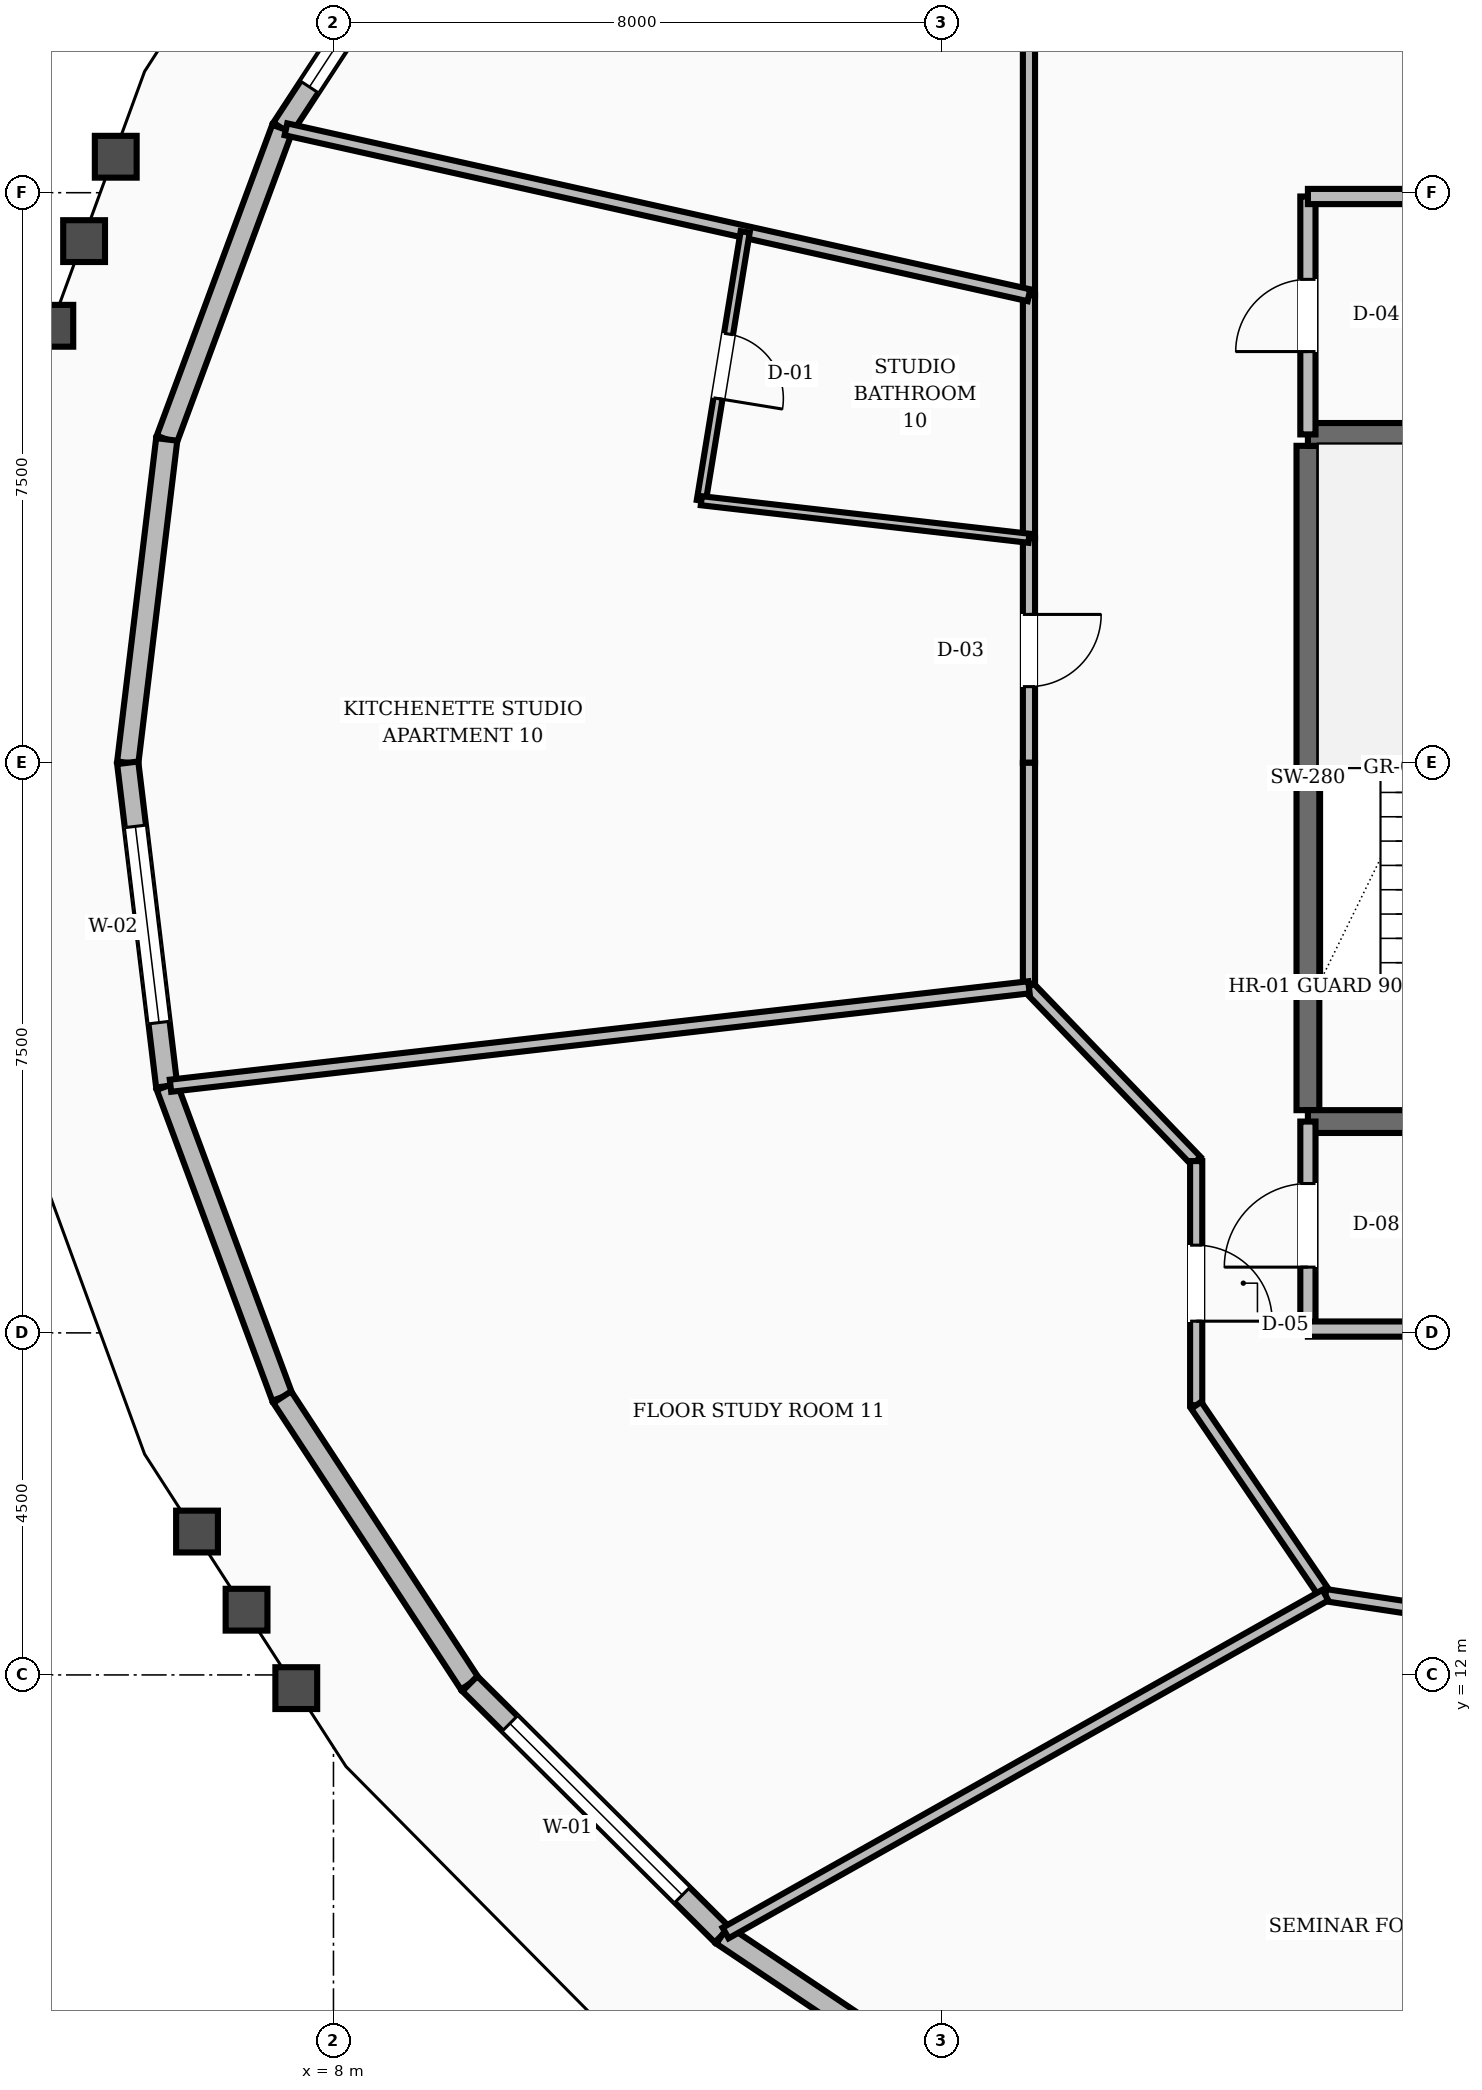
"""IFC4 building model, lengths in metres.
Left out: names, types, materials, properties, quantities, classifications, styles, units other than length and angle.
Written with IfcOpenShell. Run it as: python <this file> out.ifc"""

import sys

from ifc_helpers import new_model, si_unit, direction, frame, frame_2d, origin, place, context, subcontext, project, spatial, rectangle, extrude, element, fill, save


model = new_model("IFC4")
c1 = context("Model", 3, precision=1e-05, world=origin(), true_north=direction((0.0, 1.0)))
c2 = subcontext(c1, "Body", "Model", "MODEL_VIEW")
j1 = project(units=[si_unit("LENGTHUNIT", "METRE"), si_unit("PLANEANGLEUNIT", "RADIAN")], contexts=[c1])
p1 = place(None, origin())
s1 = spatial("IfcSite", under=j1, at=p1, CompositionType="ELEMENT")
p2 = place(p1, origin())
s2 = spatial("IfcBuilding", under=s1, at=p2, CompositionType="ELEMENT")
p3 = place(p2, frame((0.0, 0.0, 120.8)))
s3 = spatial("IfcBuildingStorey", under=s2, at=p3, CompositionType="ELEMENT", Elevation=120.8)
p4 = place(p3, frame((20.82, 19.43, 0.0), z_axis=(0.0, 0.0, 1.0), x_axis=(0.0, 1.0, 0.0)))
e1 = element("IfcWall", 1, at=p4, inside=s3, PredefinedType="SHEAR", context=c2, shape_type="SweptSolid", body=[
    extrude(rectangle(XDim=8.74, YDim=0.3, at=frame_2d((4.37, 0.0))), origin(), (0.0, 0.0, 1.0), 3.6),
])
p5 = place(p3, frame((20.82, 19.28, 0.0), z_axis=(0.0, 0.0, 1.0), x_axis=(1.0, 0.0, 0.0)))
e2 = element("IfcWall", 2, at=p5, inside=s3, PredefinedType="SHEAR", context=c2, shape_type="SweptSolid", body=[
    extrude(rectangle(XDim=3.6, YDim=0.3, at=frame_2d((1.8, 0.0))), origin(), (0.0, 0.0, 1.0), 3.6),
])
p6 = place(p5, frame((1.3, 0.0, 0.0)))
e3 = element("IfcOpeningElement", 3, at=p6, cuts=e2, PredefinedType="OPENING", context=c2, shape_type="SweptSolid", body=[
    extrude(rectangle(XDim=1.1, YDim=2.1, at=frame_2d((0.55, 1.05))), frame((0.0, 0.16, 0.0), z_axis=(0.0, -1.0, 0.0), x_axis=(1.0, 0.0, 0.0)), (0.0, 0.0, 1.0), 0.32),
])
p7 = place(p3, frame((20.82, 28.32, 0.0), z_axis=(0.0, 0.0, 1.0), x_axis=(1.0, 0.0, 0.0)))
e4 = element("IfcWall", 4, at=p7, inside=s3, PredefinedType="SHEAR", context=c2, shape_type="SweptSolid", body=[
    extrude(rectangle(XDim=3.6, YDim=0.3, at=frame_2d((1.8, 0.0))), origin(), (0.0, 0.0, 1.0), 3.6),
])
p8 = place(p3, frame((9.794, 36.115, 0.0), z_axis=(0.0, 0.0, 1.0), x_axis=(-0.547716413999, -0.836664048371, 0.0)))
e5 = element("IfcWall", 5, at=p8, inside=s3, PredefinedType="STANDARD", context=c2, shape_type="SweptSolid", body=[
    extrude(rectangle(XDim=4.506, YDim=0.28, at=frame_2d((2.253, 0.0))), origin(), (0.0, 0.0, 1.0), 2.82),
])
p9 = place(p8, frame((0.653, 0.0, 0.8)))
e6 = element("IfcOpeningElement", 6, at=p9, cuts=e5, PredefinedType="OPENING", context=c2, shape_type="SweptSolid", body=[
    extrude(rectangle(XDim=3.2, YDim=1.65, at=frame_2d((1.6, 0.825))), frame((0.0, 0.15, 0.0), z_axis=(0.0, -1.0, 0.0), x_axis=(1.0, 0.0, 0.0)), (0.0, 0.0, 1.0), 0.3),
])
p10 = place(p3, frame((7.326, 32.345, 0.0), z_axis=(0.0, 0.0, 1.0), x_axis=(-0.348252546088, -0.937400748956, 0.0)))
e7 = element("IfcWall", 7, at=p10, inside=s3, PredefinedType="STANDARD", context=c2, shape_type="SweptSolid", body=[
    extrude(rectangle(XDim=4.364, YDim=0.28, at=frame_2d((2.182, 0.0))), origin(), (0.0, 0.0, 1.0), 2.82),
])
p11 = place(p3, frame((5.806, 28.254, 0.0), z_axis=(0.0, 0.0, 1.0), x_axis=(-0.119756259899, -0.992803323028, 0.0)))
e8 = element("IfcWall", 8, at=p11, inside=s3, PredefinedType="STANDARD", context=c2, shape_type="SweptSolid", body=[
    extrude(rectangle(XDim=4.285, YDim=0.28, at=frame_2d((2.143, 0.0))), origin(), (0.0, 0.0, 1.0), 2.82),
])
p12 = place(p3, frame((5.293, 24.0, 0.0), z_axis=(0.0, 0.0, 1.0), x_axis=(0.119756259899, -0.992803323028, 0.0)))
e9 = element("IfcWall", 9, at=p12, inside=s3, PredefinedType="STANDARD", context=c2, shape_type="SweptSolid", body=[
    extrude(rectangle(XDim=4.285, YDim=0.28, at=frame_2d((2.143, 0.0))), origin(), (0.0, 0.0, 1.0), 2.82),
])
p13 = place(p12, frame((0.843, 0.0, 0.8)))
e10 = element("IfcOpeningElement", 10, at=p13, cuts=e9, PredefinedType="OPENING", context=c2, shape_type="SweptSolid", body=[
    extrude(rectangle(XDim=2.6, YDim=1.65, at=frame_2d((1.3, 0.825))), frame((0.0, 0.15, 0.0), z_axis=(0.0, -1.0, 0.0), x_axis=(1.0, 0.0, 0.0)), (0.0, 0.0, 1.0), 0.3),
])
p14 = place(p3, frame((5.806, 19.746, 0.0), z_axis=(0.0, 0.0, 1.0), x_axis=(0.348252546088, -0.937400748956, 0.0)))
e11 = element("IfcWall", 11, at=p14, inside=s3, PredefinedType="STANDARD", context=c2, shape_type="SweptSolid", body=[
    extrude(rectangle(XDim=4.364, YDim=0.28, at=frame_2d((2.182, 0.0))), origin(), (0.0, 0.0, 1.0), 2.82),
])
p15 = place(p3, frame((7.326, 15.655, 0.0), z_axis=(0.0, 0.0, 1.0), x_axis=(0.547716413999, -0.836664048371, 0.0)))
e12 = element("IfcWall", 12, at=p15, inside=s3, PredefinedType="STANDARD", context=c2, shape_type="SweptSolid", body=[
    extrude(rectangle(XDim=4.506, YDim=0.28, at=frame_2d((2.253, 0.0))), origin(), (0.0, 0.0, 1.0), 2.82),
])
p16 = place(p3, frame((9.794, 11.885, 0.0), z_axis=(0.0, 0.0, 1.0), x_axis=(0.708876231206, -0.705332892208, 0.0)))
e13 = element("IfcWall", 13, at=p16, inside=s3, PredefinedType="STANDARD", context=c2, shape_type="SweptSolid", body=[
    extrude(rectangle(XDim=4.685, YDim=0.28, at=frame_2d((2.343, 0.0))), origin(), (0.0, 0.0, 1.0), 2.82),
])
p17 = place(p16, frame((0.743, 0.0, 0.8)))
e14 = element("IfcOpeningElement", 14, at=p17, cuts=e13, PredefinedType="OPENING", context=c2, shape_type="SweptSolid", body=[
    extrude(rectangle(XDim=3.2, YDim=1.65, at=frame_2d((1.6, 0.825))), frame((0.0, 0.15, 0.0), z_axis=(0.0, -1.0, 0.0), x_axis=(1.0, 0.0, 0.0)), (0.0, 0.0, 1.0), 0.3),
])
p18 = place(p3, frame((13.115, 8.58, 0.0), z_axis=(0.0, 0.0, 1.0), x_axis=(0.830737301714, -0.556664652678, 0.0)))
e15 = element("IfcWall", 15, at=p18, inside=s3, PredefinedType="STANDARD", context=c2, shape_type="SweptSolid", body=[
    extrude(rectangle(XDim=4.872, YDim=0.28, at=frame_2d((2.436, 0.0))), origin(), (0.0, 0.0, 1.0), 2.82),
])
p19 = place(p3, frame((20.82, 16.55, 0.0), z_axis=(0.0, 0.0, 1.0), x_axis=(0.0, 1.0, 0.0)))
e16 = element("IfcWall", 16, at=p19, inside=s3, PredefinedType="SOLIDWALL", context=c2, shape_type="SweptSolid", body=[
    extrude(rectangle(XDim=2.73, YDim=0.2, at=frame_2d((1.365, 0.0))), origin(), (0.0, 0.0, 1.0), 2.8),
])
p20 = place(p19, frame((0.815, 0.0, 0.0)))
e17 = element("IfcOpeningElement", 17, at=p20, cuts=e16, PredefinedType="OPENING", context=c2, shape_type="SweptSolid", body=[
    extrude(rectangle(XDim=1.1, YDim=2.1, at=frame_2d((0.55, 1.05))), frame((0.0, 0.11, 0.0), z_axis=(0.0, -1.0, 0.0), x_axis=(1.0, 0.0, 0.0)), (0.0, 0.0, 1.0), 0.22),
])
p21 = place(p3, frame((20.82, 16.55, 0.0), z_axis=(0.0, 0.0, 1.0), x_axis=(1.0, 0.0, 0.0)))
e18 = element("IfcWall", 18, at=p21, inside=s3, PredefinedType="SOLIDWALL", context=c2, shape_type="SweptSolid", body=[
    extrude(rectangle(XDim=3.98, YDim=0.2, at=frame_2d((1.99, 0.0))), origin(), (0.0, 0.0, 1.0), 2.8),
])
p22 = place(p3, frame((20.82, 28.32, 0.0), z_axis=(0.0, 0.0, 1.0), x_axis=(0.0, 1.0, 0.0)))
e19 = element("IfcWall", 19, at=p22, inside=s3, PredefinedType="SOLIDWALL", context=c2, shape_type="SweptSolid", body=[
    extrude(rectangle(XDim=3.13, YDim=0.2, at=frame_2d((1.565, 0.0))), origin(), (0.0, 0.0, 1.0), 2.8),
])
p23 = place(p22, frame((1.09, 0.0, 0.0)))
e20 = element("IfcOpeningElement", 20, at=p23, cuts=e19, PredefinedType="OPENING", context=c2, shape_type="SweptSolid", body=[
    extrude(rectangle(XDim=0.95, YDim=2.1, at=frame_2d((0.475, 1.05))), frame((0.0, 0.11, 0.0), z_axis=(0.0, -1.0, 0.0), x_axis=(1.0, 0.0, 0.0)), (0.0, 0.0, 1.0), 0.22),
])
p24 = place(p3, frame((20.82, 31.45, 0.0), z_axis=(0.0, 0.0, 1.0), x_axis=(1.0, 0.0, 0.0)))
e21 = element("IfcWall", 21, at=p24, inside=s3, PredefinedType="SOLIDWALL", context=c2, shape_type="SweptSolid", body=[
    extrude(rectangle(XDim=3.98, YDim=0.2, at=frame_2d((1.99, 0.0))), origin(), (0.0, 0.0, 1.0), 2.8),
])
p25 = place(p3, frame((17.15, 33.923, 0.0), z_axis=(0.0, 0.0, 1.0), x_axis=(0.0, -1.0, 0.0)))
e22 = element("IfcWall", 22, at=p25, inside=s3, PredefinedType="SOLIDWALL", context=c2, shape_type="SweptSolid", body=[
    extrude(rectangle(XDim=3.771, YDim=0.16, at=frame_2d((1.886, 0.0))), origin(), (0.0, 0.0, 1.0), 2.8),
])
p26 = place(p3, frame((17.15, 30.151, 0.0), z_axis=(0.0, 0.0, 1.0), x_axis=(0.0, -1.0, 0.0)))
e23 = element("IfcWall", 23, at=p26, inside=s3, PredefinedType="SOLIDWALL", context=c2, shape_type="SweptSolid", body=[
    extrude(rectangle(XDim=3.197, YDim=0.16, at=frame_2d((1.599, 0.0))), origin(), (0.0, 0.0, 1.0), 2.8),
])
p27 = place(p3, frame((17.15, 26.954, 0.0), z_axis=(0.0, 0.0, 1.0), x_axis=(0.0, -1.0, 0.0)))
e24 = element("IfcWall", 24, at=p27, inside=s3, PredefinedType="SOLIDWALL", context=c2, shape_type="SweptSolid", body=[
    extrude(rectangle(XDim=2.954, YDim=0.16, at=frame_2d((1.477, 0.0))), origin(), (0.0, 0.0, 1.0), 2.8),
])
p28 = place(p27, frame((1.002, 0.0, 0.0)))
e25 = element("IfcOpeningElement", 25, at=p28, cuts=e24, PredefinedType="OPENING", context=c2, shape_type="SweptSolid", body=[
    extrude(rectangle(XDim=0.95, YDim=2.1, at=frame_2d((0.475, 1.05))), frame((0.0, 0.09, 0.0), z_axis=(0.0, -1.0, 0.0), x_axis=(1.0, 0.0, 0.0)), (0.0, 0.0, 1.0), 0.18),
])
p29 = place(p3, frame((17.15, 24.0, 0.0), z_axis=(0.0, 0.0, 1.0), x_axis=(0.0, -1.0, 0.0)))
e26 = element("IfcWall", 26, at=p29, inside=s3, PredefinedType="SOLIDWALL", context=c2, shape_type="SweptSolid", body=[
    extrude(rectangle(XDim=2.954, YDim=0.16, at=frame_2d((1.477, 0.0))), origin(), (0.0, 0.0, 1.0), 2.8),
])
p30 = place(p3, frame((17.15, 21.046, 0.0), z_axis=(0.0, 0.0, 1.0), x_axis=(0.693473090138, -0.72048252807, 0.0)))
e27 = element("IfcWall", 27, at=p30, inside=s3, PredefinedType="SOLIDWALL", context=c2, shape_type="SweptSolid", body=[
    extrude(rectangle(XDim=3.173, YDim=0.16, at=frame_2d((1.586, 0.0))), origin(), (0.0, 0.0, 1.0), 2.8),
])
p31 = place(p3, frame((19.35, 18.76, 0.0), z_axis=(0.0, 0.0, 1.0), x_axis=(0.0, -1.0, 0.0)))
e28 = element("IfcWall", 28, at=p31, inside=s3, PredefinedType="SOLIDWALL", context=c2, shape_type="SweptSolid", body=[
    extrude(rectangle(XDim=3.213, YDim=0.16, at=frame_2d((1.606, 0.0))), origin(), (0.0, 0.0, 1.0), 2.8),
])
p32 = place(p31, frame((1.106, 0.0, 0.0)))
e29 = element("IfcOpeningElement", 29, at=p32, cuts=e28, PredefinedType="OPENING", context=c2, shape_type="SweptSolid", body=[
    extrude(rectangle(XDim=1.0, YDim=2.1, at=frame_2d((0.5, 1.05))), frame((0.0, 0.09, 0.0), z_axis=(0.0, -1.0, 0.0), x_axis=(1.0, 0.0, 0.0)), (0.0, 0.0, 1.0), 0.18),
])
p33 = place(p3, frame((19.35, 15.548, 0.0), z_axis=(0.0, 0.0, 1.0), x_axis=(0.562674669208, -0.826678423955, 0.0)))
e30 = element("IfcWall", 30, at=p33, inside=s3, PredefinedType="SOLIDWALL", context=c2, shape_type="SweptSolid", body=[
    extrude(rectangle(XDim=3.021, YDim=0.16, at=frame_2d((1.511, 0.0))), origin(), (0.0, 0.0, 1.0), 2.8),
])
p34 = place(p3, frame((21.05, 13.05, 0.0), z_axis=(0.0, 0.0, 1.0), x_axis=(0.988710906508, -0.149835721217, 0.0)))
e31 = element("IfcWall", 31, at=p34, inside=s3, PredefinedType="SOLIDWALL", context=c2, shape_type="SweptSolid", body=[
    extrude(rectangle(XDim=3.337, YDim=0.16, at=frame_2d((1.668, 0.0))), origin(), (0.0, 0.0, 1.0), 2.8),
])
p35 = place(p3, frame((17.15, 30.151, 0.0), z_axis=(0.0, 0.0, 1.0), x_axis=(-0.975957101014, 0.217962696303, 0.0)))
e32 = element("IfcWall", 32, at=p35, inside=s3, PredefinedType="SOLIDWALL", context=c2, shape_type="SweptSolid", body=[
    extrude(rectangle(XDim=10.016, YDim=0.16, at=frame_2d((5.008, 0.0))), origin(), (0.0, 0.0, 1.0), 2.8),
])
p36 = place(p3, frame((13.417, 30.985, 0.0), z_axis=(0.0, 0.0, 1.0), x_axis=(-0.161117002458, -0.986935312733, 0.0)))
e33 = element("IfcWall", 33, at=p36, inside=s3, PredefinedType="PARTITIONING", context=c2, shape_type="SweptSolid", body=[
    extrude(rectangle(XDim=3.584, YDim=0.12, at=frame_2d((1.792, 0.0))), origin(), (0.0, 0.0, 1.0), 2.8),
])
p37 = place(p36, frame((1.362, 0.0, 0.0)))
e34 = element("IfcOpeningElement", 34, at=p37, cuts=e33, PredefinedType="OPENING", context=c2, shape_type="SweptSolid", body=[
    extrude(rectangle(XDim=0.86, YDim=2.1, at=frame_2d((0.43, 1.05))), frame((0.0, 0.07, 0.0), z_axis=(0.0, -1.0, 0.0), x_axis=(1.0, 0.0, 0.0)), (0.0, 0.0, 1.0), 0.14),
])
p38 = place(p3, frame((17.15, 26.954, 0.0), z_axis=(0.0, 0.0, 1.0), x_axis=(-0.993493438014, 0.113889370103, 0.0)))
e35 = element("IfcWall", 35, at=p38, inside=s3, PredefinedType="PARTITIONING", context=c2, shape_type="SweptSolid", body=[
    extrude(rectangle(XDim=4.339, YDim=0.12, at=frame_2d((2.169, 0.0))), origin(), (0.0, 0.0, 1.0), 2.8),
])
p39 = place(p3, frame((17.15, 21.046, 0.0), z_axis=(0.0, 0.0, 1.0), x_axis=(-0.993493502976, -0.113888803422, 0.0)))
e36 = element("IfcWall", 36, at=p39, inside=s3, PredefinedType="SOLIDWALL", context=c2, shape_type="SweptSolid", body=[
    extrude(rectangle(XDim=11.368, YDim=0.16, at=frame_2d((5.684, 0.0))), origin(), (0.0, 0.0, 1.0), 2.8),
])
p40 = place(p3, frame((21.05, 13.05, 0.0), z_axis=(0.0, 0.0, 1.0), x_axis=(-0.871265811463, -0.490811456442, 0.0)))
e37 = element("IfcWall", 37, at=p40, inside=s3, PredefinedType="SOLIDWALL", context=c2, shape_type="SweptSolid", body=[
    extrude(rectangle(XDim=9.057, YDim=0.16, at=frame_2d((4.529, 0.0))), origin(), (0.0, 0.0, 1.0), 2.8),
])
p41 = place(p9, origin())
e38 = element("IfcWindow", 38, at=p41, inside=s3, PartitioningType="SINGLE_PANEL", PredefinedType="WINDOW", context=c2, shape_type="SweptSolid", body=[
    extrude(rectangle(XDim=3.2, YDim=1.65, at=frame_2d((1.6, 0.825))), frame((0.0, 0.03, 0.0), z_axis=(0.0, -1.0, 0.0), x_axis=(1.0, 0.0, 0.0)), (0.0, 0.0, 1.0), 0.06),
])
fill(e6, e38)
p42 = place(p13, origin())
e39 = element("IfcWindow", 39, at=p42, inside=s3, PartitioningType="SINGLE_PANEL", PredefinedType="WINDOW", context=c2, shape_type="SweptSolid", body=[
    extrude(rectangle(XDim=2.6, YDim=1.65, at=frame_2d((1.3, 0.825))), frame((0.0, 0.03, 0.0), z_axis=(0.0, -1.0, 0.0), x_axis=(1.0, 0.0, 0.0)), (0.0, 0.0, 1.0), 0.06),
])
fill(e10, e39)
p43 = place(p17, origin())
e40 = element("IfcWindow", 40, at=p43, inside=s3, PartitioningType="SINGLE_PANEL", PredefinedType="WINDOW", context=c2, shape_type="SweptSolid", body=[
    extrude(rectangle(XDim=3.2, YDim=1.65, at=frame_2d((1.6, 0.825))), frame((0.0, 0.03, 0.0), z_axis=(0.0, -1.0, 0.0), x_axis=(1.0, 0.0, 0.0)), (0.0, 0.0, 1.0), 0.06),
])
fill(e14, e40)
p44 = place(p20, origin())
e41 = element("IfcDoor", 41, at=p44, inside=s3, OperationType="SINGLE_SWING_LEFT", PredefinedType="DOOR", context=c2, shape_type="SweptSolid", body=[
    extrude(rectangle(XDim=1.1, YDim=2.1, at=frame_2d((0.55, 1.05))), frame((0.0, 0.025, 0.0), z_axis=(0.0, -1.0, 0.0), x_axis=(1.0, 0.0, 0.0)), (0.0, 0.0, 1.0), 0.05),
])
fill(e17, e41)
p45 = place(p23, origin())
e42 = element("IfcDoor", 42, at=p45, inside=s3, OperationType="SINGLE_SWING_LEFT", PredefinedType="DOOR", context=c2, shape_type="SweptSolid", body=[
    extrude(rectangle(XDim=0.95, YDim=2.1, at=frame_2d((0.475, 1.05))), frame((0.0, 0.025, 0.0), z_axis=(0.0, -1.0, 0.0), x_axis=(1.0, 0.0, 0.0)), (0.0, 0.0, 1.0), 0.05),
])
fill(e20, e42)
p46 = place(p37, origin())
e43 = element("IfcDoor", 43, at=p46, inside=s3, OperationType="SINGLE_SWING_RIGHT", PredefinedType="DOOR", context=c2, shape_type="SweptSolid", body=[
    extrude(rectangle(XDim=0.86, YDim=2.1, at=frame_2d((0.43, 1.05))), frame((0.0, 0.025, 0.0), z_axis=(0.0, -1.0, 0.0), x_axis=(1.0, 0.0, 0.0)), (0.0, 0.0, 1.0), 0.05),
])
fill(e34, e43)
p47 = place(p28, origin())
e44 = element("IfcDoor", 44, at=p47, inside=s3, OperationType="SINGLE_SWING_LEFT", PredefinedType="DOOR", context=c2, shape_type="SweptSolid", body=[
    extrude(rectangle(XDim=0.95, YDim=2.1, at=frame_2d((0.475, 1.05))), frame((0.0, 0.025, 0.0), z_axis=(0.0, -1.0, 0.0), x_axis=(1.0, 0.0, 0.0)), (0.0, 0.0, 1.0), 0.05),
])
fill(e25, e44)
p48 = place(p32, origin())
e45 = element("IfcDoor", 45, at=p48, inside=s3, OperationType="SINGLE_SWING_RIGHT", PredefinedType="DOOR", context=c2, shape_type="SweptSolid", body=[
    extrude(rectangle(XDim=1.0, YDim=2.1, at=frame_2d((0.5, 1.05))), frame((0.0, 0.025, 0.0), z_axis=(0.0, -1.0, 0.0), x_axis=(1.0, 0.0, 0.0)), (0.0, 0.0, 1.0), 0.05),
])
fill(e29, e45)
save(model, sys.argv[1])
